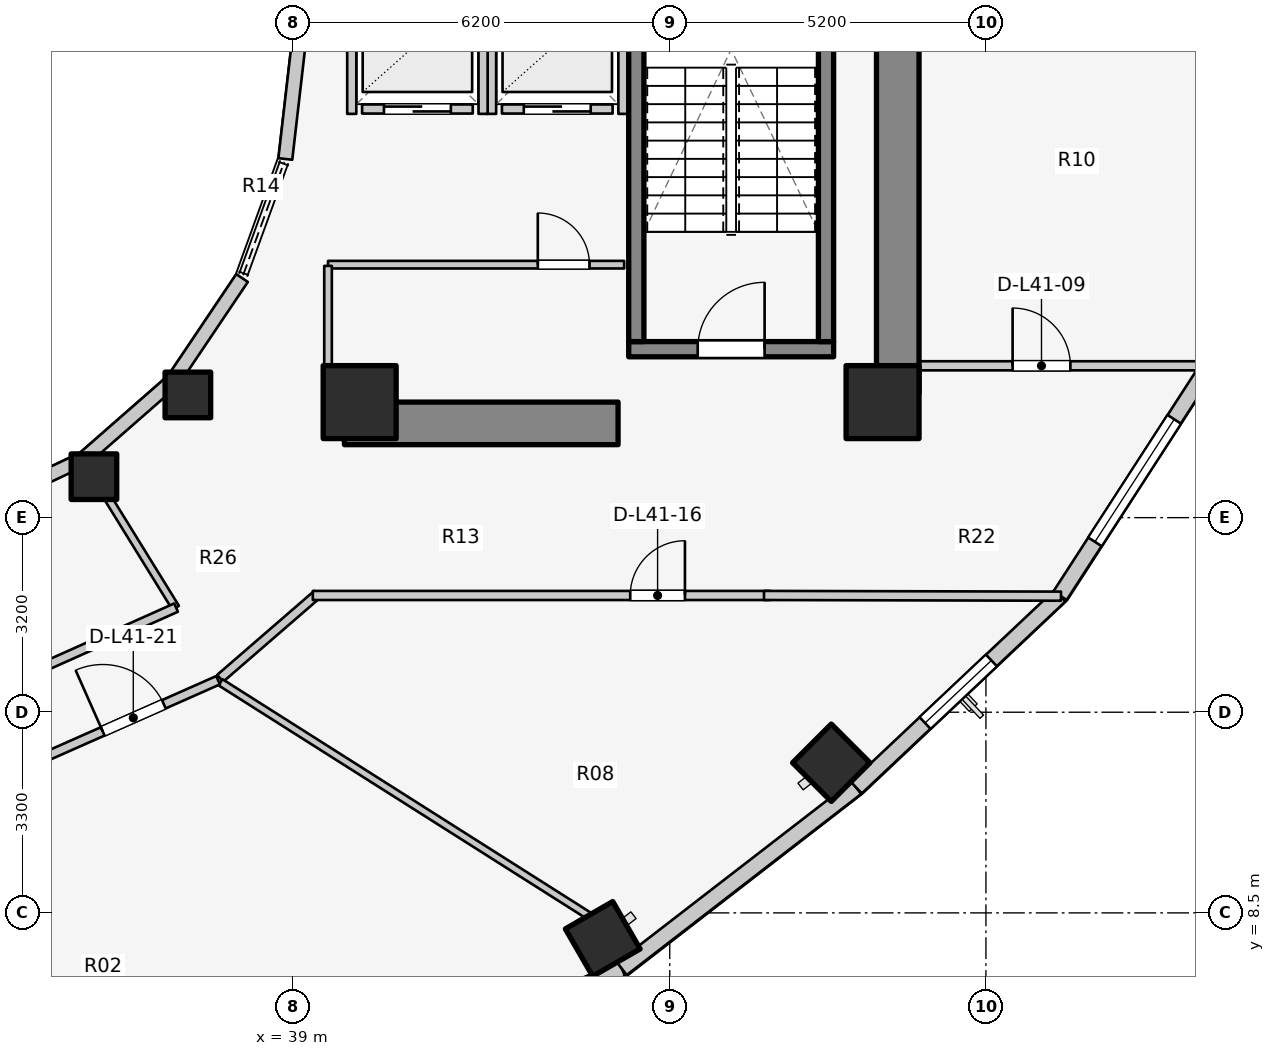
"""IFC4 building model, lengths in metres.
Left out: names, types, materials, properties, quantities, classifications, styles, units other than length and angle.
Written with IfcOpenShell. Run it as: python <this file> out.ifc"""

import sys

from ifc_helpers import new_model, si_unit, direction, frame, frame_2d, origin, origin_2d, place, context, subcontext, project, spatial, rectangle, extrude, element, fill, save


model = new_model("IFC4")
c1 = context("Model", 3, precision=1e-05, world=origin(), true_north=direction((0.0, 1.0)))
c2 = subcontext(c1, "Body", "Model", "MODEL_VIEW")
j1 = project(units=[si_unit("LENGTHUNIT", "METRE"), si_unit("PLANEANGLEUNIT", "RADIAN")], contexts=[c1])
p1 = place(None, origin())
s1 = spatial("IfcSite", under=j1, at=p1, CompositionType="ELEMENT")
p2 = place(p1, origin())
s2 = spatial("IfcBuilding", under=s1, at=p2, CompositionType="ELEMENT")
p3 = place(p2, frame((0.0, 0.0, 137.4)))
s3 = spatial("IfcBuildingStorey", under=s2, at=p3, CompositionType="ELEMENT", Elevation=137.4)
p4 = place(p3, frame((48.95, 17.05, 0.0), z_axis=(0.0, 0.0, 1.0), x_axis=(0.0, 1.0, 0.0)))
e1 = element("IfcWall", 1, at=p4, inside=s3, PredefinedType="SHEAR", context=c2, shape_type="SweptSolid", body=[
    extrude(rectangle(XDim=12.8, YDim=0.7, at=frame_2d((6.4, 0.0))), origin(), (0.0, 0.0, 1.0), 3.1),
])
p5 = place(p3, frame((39.85, 16.55, 0.0), z_axis=(0.0, 0.0, 1.0), x_axis=(1.0, 0.0, 0.0)))
e2 = element("IfcWall", 2, at=p5, inside=s3, PredefinedType="SHEAR", context=c2, shape_type="SweptSolid", body=[
    extrude(rectangle(XDim=4.5, YDim=0.7, at=frame_2d((2.25, 0.0))), origin(), (0.0, 0.0, 1.0), 3.1),
])
p6 = place(p3, frame((44.525, 17.77, 0.0), z_axis=(0.0, 0.0, 1.0), x_axis=(1.0, 0.0, 0.0)))
e3 = element("IfcWall", 3, at=p6, inside=s3, PredefinedType="SOLIDWALL", context=c2, shape_type="SweptSolid", body=[
    extrude(rectangle(XDim=3.37, YDim=0.25, at=frame_2d((1.685, 0.0))), origin(), (0.0, 0.0, 1.0), 3.1),
])
p7 = place(p6, frame((1.135, 0.0, 0.0)))
e4 = element("IfcOpeningElement", 4, at=p7, cuts=e3, PredefinedType="OPENING", context=c2, shape_type="SweptSolid", body=[
    extrude(rectangle(XDim=1.1, YDim=2.1, at=frame_2d((0.55, 1.05))), frame((0.0, 0.135, 0.0), z_axis=(0.0, -1.0, 0.0), x_axis=(1.0, 0.0, 0.0)), (0.0, 0.0, 1.0), 0.27),
])
for number, where, z_axis, x_axis in (
    (5, (44.65, 17.895, 0.0), (0.0, 0.0, 1.0), (0.0, 1.0, 0.0)),
    (6, (47.77, 17.895, 0.0), (0.0, 0.0, 1.0), (0.0, 1.0, 0.0)),
):
    element("IfcWall", number, at=place(p3, frame(where, z_axis=z_axis, x_axis=x_axis)), inside=s3, PredefinedType="SOLIDWALL", context=c2, shape_type="SweptSolid", body=[
        extrude(rectangle(XDim=7.81, YDim=0.25, at=frame_2d((3.905, 0.0))), origin(), (0.0, 0.0, 1.0), 3.1),
    ])
for number, where, z_axis, x_axis in (
    (7, (40.1, 16.9, 0.0), (0.0, 0.0, 1.0), (1.0, 0.0, 0.0)),
    (8, (48.7, 16.9, 0.0), (0.0, 0.0, 1.0), (1.0, 0.0, 0.0)),
):
    element("IfcColumn", number, at=place(p3, frame(where, z_axis=z_axis, x_axis=x_axis)), inside=s3, PredefinedType="COLUMN", context=c2, shape_type="SweptSolid", body=[
        extrude(rectangle(XDim=1.2, YDim=1.2, at=origin_2d()), origin(), (0.0, 0.0, 1.0), 3.1),
    ])
p8 = place(p3, frame((35.73, 15.673, 0.0), z_axis=(0.0, 0.0, 1.0), x_axis=(1.0, 0.0, 0.0)))
e9 = element("IfcColumn", 9, at=p8, inside=s3, PredefinedType="COLUMN", context=c2, shape_type="SweptSolid", body=[
    extrude(rectangle(XDim=0.75, YDim=0.75, at=origin_2d()), origin(), (0.0, 0.0, 1.0), 3.1),
])
p9 = place(p3, frame((44.098, 8.072, 0.0), z_axis=(0.0, 0.0, 1.0), x_axis=(0.5, -0.866025403784, 0.0)))
e10 = element("IfcColumn", 10, at=p9, inside=s3, PredefinedType="COLUMN", context=c2, shape_type="SweptSolid", body=[
    extrude(rectangle(XDim=0.9, YDim=0.9, at=origin_2d()), origin(), (0.0, 0.0, 1.0), 3.1),
])
p10 = place(p3, frame((37.275, 17.018, 0.0), z_axis=(0.0, 0.0, 1.0), x_axis=(1.0, 0.0, 0.0)))
e11 = element("IfcColumn", 11, at=p10, inside=s3, PredefinedType="COLUMN", context=c2, shape_type="SweptSolid", body=[
    extrude(rectangle(XDim=0.75, YDim=0.75, at=origin_2d()), origin(), (0.0, 0.0, 1.0), 3.1),
])
p11 = place(p3, frame((47.857, 10.969, 0.0), z_axis=(0.0, 0.0, 1.0), x_axis=(0.707106781187, -0.707106781187, 0.0)))
e12 = element("IfcColumn", 12, at=p11, inside=s3, PredefinedType="COLUMN", context=c2, shape_type="SweptSolid", body=[
    extrude(rectangle(XDim=0.9, YDim=0.9, at=origin_2d()), origin(), (0.0, 0.0, 1.0), 3.1),
])
p12 = place(p3, frame((33.843, 15.157, 0.0), z_axis=(0.0, 0.0, 1.0), x_axis=(0.904179699603, 0.427152280606, 0.0)))
e13 = element("IfcWall", 13, at=p12, inside=s3, PredefinedType="STANDARD", context=c2, shape_type="SweptSolid", body=[
    extrude(rectangle(XDim=1.899, YDim=0.23, at=frame_2d((0.95, 0.0))), origin(), (0.0, 0.0, 1.0), 2.16),
])
p13 = place(p3, frame((35.56, 15.968, 0.0), z_axis=(0.0, 0.0, 1.0), x_axis=(0.752576694707, 0.658504607869, 0.0)))
e14 = element("IfcWall", 14, at=p13, inside=s3, PredefinedType="STANDARD", context=c2, shape_type="SweptSolid", body=[
    extrude(rectangle(XDim=1.959, YDim=0.23, at=frame_2d((0.98, 0.0))), origin(), (0.0, 0.0, 1.0), 2.16),
])
p14 = place(p3, frame((37.035, 17.258, 0.0), z_axis=(0.0, 0.0, 1.0), x_axis=(0.558197800898, 0.829707909492, 0.0)))
e15 = element("IfcWall", 15, at=p14, inside=s3, PredefinedType="STANDARD", context=c2, shape_type="SweptSolid", body=[
    extrude(rectangle(XDim=2.027, YDim=0.23, at=frame_2d((1.013, 0.0))), origin(), (0.0, 0.0, 1.0), 2.16),
])
p15 = place(p3, frame((38.877, 20.898, 0.0), z_axis=(0.0, 0.0, 1.0), x_axis=(0.114711713601, 0.993398823617, 0.0)))
e16 = element("IfcWall", 16, at=p15, inside=s3, PredefinedType="STANDARD", context=c2, shape_type="SweptSolid", body=[
    extrude(rectangle(XDim=2.115, YDim=0.23, at=frame_2d((1.058, 0.0))), origin(), (0.0, 0.0, 1.0), 2.84),
])
p16 = place(p3, frame((39.365, 5.315, 0.0), z_axis=(0.0, 0.0, 1.0), x_axis=(0.912353637112, 0.409403029847, 0.0)))
e17 = element("IfcWall", 17, at=p16, inside=s3, PredefinedType="STANDARD", context=c2, shape_type="SweptSolid", body=[
    extrude(rectangle(XDim=5.533, YDim=0.26, at=frame_2d((2.766, 0.0))), origin(), (0.0, 0.0, 1.0), 2.85),
])
p17 = place(p16, frame((1.566, 0.0, 0.75)))
e18 = element("IfcOpeningElement", 18, at=p17, cuts=e17, PredefinedType="OPENING", context=c2, shape_type="SweptSolid", body=[
    extrude(rectangle(XDim=2.4, YDim=1.7, at=frame_2d((1.2, 0.85))), frame((0.0, 0.14, 0.0), z_axis=(0.0, -1.0, 0.0), x_axis=(1.0, 0.0, 0.0)), (0.0, 0.0, 1.0), 0.28),
])
p18 = place(p3, frame((44.413, 7.581, 0.0), z_axis=(0.0, 0.0, 1.0), x_axis=(0.791460185804, 0.611220724687, 0.0)))
e19 = element("IfcWall", 19, at=p18, inside=s3, PredefinedType="STANDARD", context=c2, shape_type="SweptSolid", body=[
    extrude(rectangle(XDim=4.872, YDim=0.26, at=frame_2d((2.436, 0.0))), origin(), (0.0, 0.0, 1.0), 2.85),
])
p19 = place(p3, frame((48.269, 10.559, 0.0), z_axis=(0.0, 0.0, 1.0), x_axis=(0.727667301037, 0.68593024354, 0.0)))
e20 = element("IfcWall", 20, at=p19, inside=s3, PredefinedType="STANDARD", context=c2, shape_type="SweptSolid", body=[
    extrude(rectangle(XDim=4.604, YDim=0.26, at=frame_2d((2.302, 0.0))), origin(), (0.0, 0.0, 1.0), 2.85),
])
p20 = place(p19, frame((1.552, 0.0, 0.75)))
e21 = element("IfcOpeningElement", 21, at=p20, cuts=e20, PredefinedType="OPENING", context=c2, shape_type="SweptSolid", body=[
    extrude(rectangle(XDim=1.5, YDim=1.6, at=frame_2d((0.75, 0.8))), frame((0.0, 0.14, 0.0), z_axis=(0.0, -1.0, 0.0), x_axis=(1.0, 0.0, 0.0)), (0.0, 0.0, 1.0), 0.28),
])
p21 = place(p3, frame((51.619, 13.716, 0.0), z_axis=(0.0, 0.0, 1.0), x_axis=(0.543358984534, 0.839500454989, 0.0)))
e22 = element("IfcWall", 22, at=p21, inside=s3, PredefinedType="STANDARD", context=c2, shape_type="SweptSolid", body=[
    extrude(rectangle(XDim=4.511, YDim=0.26, at=frame_2d((2.256, 0.0))), origin(), (0.0, 0.0, 1.0), 2.85),
])
p22 = place(p21, frame((1.056, 0.0, 0.75)))
e23 = element("IfcOpeningElement", 23, at=p22, cuts=e22, PredefinedType="OPENING", context=c2, shape_type="SweptSolid", body=[
    extrude(rectangle(XDim=2.4, YDim=1.7, at=frame_2d((1.2, 0.85))), frame((0.0, 0.14, 0.0), z_axis=(0.0, -1.0, 0.0), x_axis=(1.0, 0.0, 0.0)), (0.0, 0.0, 1.0), 0.28),
])
p23 = place(p3, frame((42.44, 21.72, 0.0), z_axis=(0.0, 0.0, 1.0), x_axis=(1.0, 0.0, 0.0)))
e24 = element("IfcWall", 24, at=p23, inside=s3, PredefinedType="SOLIDWALL", context=c2, shape_type="SweptSolid", body=[
    extrude(rectangle(XDim=1.82, YDim=0.15, at=frame_2d((0.91, 0.0))), origin(), (0.0, 0.0, 1.0), 2.855),
])
p24 = place(p23, frame((0.36, 0.0, 0.0)))
e25 = element("IfcOpeningElement", 25, at=p24, cuts=e24, PredefinedType="OPENING", context=c2, shape_type="SweptSolid", body=[
    extrude(rectangle(XDim=1.1, YDim=2.1, at=frame_2d((0.55, 1.05))), frame((0.0, 0.085, 0.0), z_axis=(0.0, -1.0, 0.0), x_axis=(1.0, 0.0, 0.0)), (0.0, 0.0, 1.0), 0.17),
])
for number, where, z_axis, x_axis in (
    (26, (42.27, 21.64, 0.0), (0.0, 0.0, 1.0), (0.0, 1.0, 0.0)),
    (27, (44.43, 21.64, 0.0), (0.0, 0.0, 1.0), (0.0, 1.0, 0.0)),
):
    element("IfcWall", number, at=place(p3, frame(where, z_axis=z_axis, x_axis=x_axis)), inside=s3, PredefinedType="SOLIDWALL", context=c2, shape_type="SweptSolid", body=[
        extrude(rectangle(XDim=2.32, YDim=0.15, at=frame_2d((1.16, 0.0))), origin(), (0.0, 0.0, 1.0), 2.855),
    ])
p25 = place(p3, frame((40.14, 21.72, 0.0), z_axis=(0.0, 0.0, 1.0), x_axis=(1.0, 0.0, 0.0)))
e28 = element("IfcWall", 28, at=p25, inside=s3, PredefinedType="SOLIDWALL", context=c2, shape_type="SweptSolid", body=[
    extrude(rectangle(XDim=1.82, YDim=0.15, at=frame_2d((0.91, 0.0))), origin(), (0.0, 0.0, 1.0), 2.12),
])
p26 = place(p25, frame((0.36, 0.0, 0.0)))
e29 = element("IfcOpeningElement", 29, at=p26, cuts=e28, PredefinedType="OPENING", context=c2, shape_type="SweptSolid", body=[
    extrude(rectangle(XDim=1.1, YDim=2.1, at=frame_2d((0.55, 1.05))), frame((0.0, 0.085, 0.0), z_axis=(0.0, -1.0, 0.0), x_axis=(1.0, 0.0, 0.0)), (0.0, 0.0, 1.0), 0.17),
])
p27 = place(p3, frame((39.97, 21.64, 0.0), z_axis=(0.0, 0.0, 1.0), x_axis=(0.0, 1.0, 0.0)))
e30 = element("IfcWall", 30, at=p27, inside=s3, PredefinedType="SOLIDWALL", context=c2, shape_type="SweptSolid", body=[
    extrude(rectangle(XDim=2.32, YDim=0.15, at=frame_2d((1.16, 0.0))), origin(), (0.0, 0.0, 1.0), 2.12),
])
p28 = place(p3, frame((42.13, 21.64, 0.0), z_axis=(0.0, 0.0, 1.0), x_axis=(0.0, 1.0, 0.0)))
e31 = element("IfcWall", 31, at=p28, inside=s3, PredefinedType="SOLIDWALL", context=c2, shape_type="SweptSolid", body=[
    extrude(rectangle(XDim=2.32, YDim=0.15, at=frame_2d((1.16, 0.0))), origin(), (0.0, 0.0, 1.0), 2.855),
])
p29 = place(p3, frame((39.58, 19.16, 0.0), z_axis=(0.0, 0.0, 1.0), x_axis=(1.0, 0.0, 0.0)))
e32 = element("IfcWall", 32, at=p29, inside=s3, PredefinedType="PARTITIONING", context=c2, shape_type="SweptSolid", body=[
    extrude(rectangle(XDim=4.87, YDim=0.125, at=frame_2d((2.435, 0.0))), origin(), (0.0, 0.0, 1.0), 2.12),
])
p30 = place(p29, frame((3.45, 0.0, 0.0)))
e33 = element("IfcOpeningElement", 33, at=p30, cuts=e32, PredefinedType="OPENING", context=c2, shape_type="SweptSolid", body=[
    extrude(rectangle(XDim=0.85, YDim=2.05, at=frame_2d((0.425, 1.025))), frame((0.0, 0.073, 0.0), z_axis=(0.0, -1.0, 0.0), x_axis=(1.0, 0.0, 0.0)), (0.0, 0.0, 1.0), 0.145),
])
p31 = place(p3, frame((39.58, 17.1, 0.0), z_axis=(0.0, 0.0, 1.0), x_axis=(0.0, 1.0, 0.0)))
e34 = element("IfcWall", 34, at=p31, inside=s3, PredefinedType="PARTITIONING", context=c2, shape_type="SweptSolid", body=[
    extrude(rectangle(XDim=2.04, YDim=0.125, at=frame_2d((1.02, 0.0))), origin(), (0.0, 0.0, 1.0), 2.232),
])
p32 = place(p3, frame((48.95, 17.497, 0.0), z_axis=(0.0, 0.0, 1.0), x_axis=(1.0, 0.0, 0.0)))
e35 = element("IfcWall", 35, at=p32, inside=s3, PredefinedType="PARTITIONING", context=c2, shape_type="SweptSolid", body=[
    extrude(rectangle(XDim=5.14, YDim=0.15, at=frame_2d((2.57, 0.0))), origin(), (0.0, 0.0, 1.0), 2.855),
])
p33 = place(p32, frame((1.889, 0.0, 0.0)))
e36 = element("IfcOpeningElement", 36, at=p33, cuts=e35, PredefinedType="OPENING", context=c2, shape_type="SweptSolid", body=[
    extrude(rectangle(XDim=0.95, YDim=2.1, at=frame_2d((0.475, 1.05))), frame((0.0, 0.085, 0.0), z_axis=(0.0, -1.0, 0.0), x_axis=(1.0, 0.0, 0.0)), (0.0, 0.0, 1.0), 0.17),
])
p34 = place(p3, frame((37.807, 12.358, 0.0), z_axis=(0.0, 0.0, 1.0), x_axis=(0.756055312247, 0.654507727092, 0.0)))
e37 = element("IfcWall", 37, at=p34, inside=s3, PredefinedType="PARTITIONING", context=c2, shape_type="SweptSolid", body=[
    extrude(rectangle(XDim=2.111, YDim=0.15, at=frame_2d((1.055, 0.0))), origin(), (0.0, 0.0, 1.0), 2.299),
])
p35 = place(p3, frame((39.33, 13.72, 0.0), z_axis=(0.0, 0.0, 1.0), x_axis=(1.0, 0.0, 0.0)))
e38 = element("IfcWall", 38, at=p35, inside=s3, PredefinedType="PARTITIONING", context=c2, shape_type="SweptSolid", body=[
    extrude(rectangle(XDim=7.52, YDim=0.15, at=frame_2d((3.76, 0.0))), origin(), (0.0, 0.0, 1.0), 2.299),
])
p36 = place(p35, frame((5.22, 0.0, 0.0)))
e39 = element("IfcOpeningElement", 39, at=p36, cuts=e38, PredefinedType="OPENING", context=c2, shape_type="SweptSolid", body=[
    extrude(rectangle(XDim=0.9, YDim=2.1, at=frame_2d((0.45, 1.05))), frame((0.0, 0.085, 0.0), z_axis=(0.0, -1.0, 0.0), x_axis=(1.0, 0.0, 0.0)), (0.0, 0.0, 1.0), 0.17),
])
p37 = place(p3, frame((46.75, 13.72, 0.0), z_axis=(0.0, 0.0, 1.0), x_axis=(0.999997122315, -0.00239903348, 0.0)))
e40 = element("IfcWall", 40, at=p37, inside=s3, PredefinedType="PARTITIONING", context=c2, shape_type="SweptSolid", body=[
    extrude(rectangle(XDim=4.885, YDim=0.15, at=frame_2d((2.442, 0.0))), origin(), (0.0, 0.0, 1.0), 2.22),
])
p38 = place(p3, frame((35.55, 15.985, 0.0), z_axis=(0.0, 0.0, 1.0), x_axis=(0.525627246902, -0.850714991824, 0.0)))
e41 = element("IfcWall", 41, at=p38, inside=s3, PredefinedType="PARTITIONING", context=c2, shape_type="SweptSolid", body=[
    extrude(rectangle(XDim=2.901, YDim=0.125, at=frame_2d((1.451, 0.0))), origin(), (0.0, 0.0, 1.0), 2.299),
])
p39 = place(p3, frame((34.625, 12.423, 0.0), z_axis=(0.0, 0.0, 1.0), x_axis=(0.912888568324, 0.408208845842, 0.0)))
e42 = element("IfcWall", 42, at=p39, inside=s3, PredefinedType="PARTITIONING", context=c2, shape_type="SweptSolid", body=[
    extrude(rectangle(XDim=2.69, YDim=0.15, at=frame_2d((1.345, 0.0))), origin(), (0.0, 0.0, 1.0), 2.299),
])
p40 = place(p3, frame((37.812, 12.292, 0.0), z_axis=(0.0, 0.0, 1.0), x_axis=(0.844640430122, -0.535334048799, 0.0)))
e43 = element("IfcWall", 43, at=p40, inside=s3, PredefinedType="MOVABLE", context=c2, shape_type="SweptSolid", body=[
    extrude(rectangle(XDim=7.188, YDim=0.12, at=frame_2d((3.594, 0.0))), origin(), (0.0, 0.0, 1.0), 2.299),
])
p41 = place(p3, frame((34.982, 11.09, 0.0), z_axis=(0.0, 0.0, 1.0), x_axis=(0.914216890927, 0.405225216815, 0.0)))
e44 = element("IfcWall", 44, at=p41, inside=s3, PredefinedType="PARTITIONING", context=c2, shape_type="SweptSolid", body=[
    extrude(rectangle(XDim=3.052, YDim=0.15, at=frame_2d((1.526, 0.0))), origin(), (0.0, 0.0, 1.0), 2.299),
])
p42 = place(p41, frame((0.976, 0.0, 0.0)))
e45 = element("IfcOpeningElement", 45, at=p42, cuts=e44, PredefinedType="OPENING", context=c2, shape_type="SweptSolid", body=[
    extrude(rectangle(XDim=1.1, YDim=2.1, at=frame_2d((0.55, 1.05))), frame((0.0, 0.085, 0.0), z_axis=(0.0, -1.0, 0.0), x_axis=(1.0, 0.0, 0.0)), (0.0, 0.0, 1.0), 0.17),
])
p43 = place(p20, origin())
e46 = element("IfcWindow", 46, at=p43, inside=s3, PartitioningType="SINGLE_PANEL", PredefinedType="WINDOW", context=c2, shape_type="SweptSolid", body=[
    extrude(rectangle(XDim=1.5, YDim=1.6, at=frame_2d((0.75, 0.8))), frame((0.0, 0.03, 0.0), z_axis=(0.0, -1.0, 0.0), x_axis=(1.0, 0.0, 0.0)), (0.0, 0.0, 1.0), 0.06),
])
fill(e21, e46)
p44 = place(p22, origin())
e47 = element("IfcWindow", 47, at=p44, inside=s3, PartitioningType="SINGLE_PANEL", PredefinedType="WINDOW", context=c2, shape_type="SweptSolid", body=[
    extrude(rectangle(XDim=2.4, YDim=1.7, at=frame_2d((1.2, 0.85))), frame((0.0, 0.03, 0.0), z_axis=(0.0, -1.0, 0.0), x_axis=(1.0, 0.0, 0.0)), (0.0, 0.0, 1.0), 0.06),
])
fill(e23, e47)
p45 = place(p7, origin())
e48 = element("IfcDoor", 48, at=p45, inside=s3, OperationType="SINGLE_SWING_RIGHT", PredefinedType="DOOR", context=c2, shape_type="SweptSolid", body=[
    extrude(rectangle(XDim=1.1, YDim=2.1, at=frame_2d((0.55, 1.05))), frame((0.0, 0.025, 0.0), z_axis=(0.0, -1.0, 0.0), x_axis=(1.0, 0.0, 0.0)), (0.0, 0.0, 1.0), 0.05),
])
fill(e4, e48)
p46 = place(p24, origin())
e49 = element("IfcDoor", 49, at=p46, inside=s3, OperationType="DOUBLE_DOOR_SLIDING", PredefinedType="DOOR", context=c2, shape_type="SweptSolid", body=[
    extrude(rectangle(XDim=1.1, YDim=2.1, at=frame_2d((0.55, 1.05))), frame((0.0, 0.025, 0.0), z_axis=(0.0, -1.0, 0.0), x_axis=(1.0, 0.0, 0.0)), (0.0, 0.0, 1.0), 0.05),
])
fill(e25, e49)
p47 = place(p26, origin())
e50 = element("IfcDoor", 50, at=p47, inside=s3, OperationType="DOUBLE_DOOR_SLIDING", PredefinedType="DOOR", context=c2, shape_type="SweptSolid", body=[
    extrude(rectangle(XDim=1.1, YDim=2.1, at=frame_2d((0.55, 1.05))), frame((0.0, 0.025, 0.0), z_axis=(0.0, -1.0, 0.0), x_axis=(1.0, 0.0, 0.0)), (0.0, 0.0, 1.0), 0.05),
])
fill(e29, e50)
p48 = place(p30, origin())
e51 = element("IfcDoor", 51, at=p48, inside=s3, OperationType="SINGLE_SWING_LEFT", PredefinedType="DOOR", context=c2, shape_type="SweptSolid", body=[
    extrude(rectangle(XDim=0.85, YDim=2.05, at=frame_2d((0.425, 1.025))), frame((0.0, 0.025, 0.0), z_axis=(0.0, -1.0, 0.0), x_axis=(1.0, 0.0, 0.0)), (0.0, 0.0, 1.0), 0.05),
])
fill(e33, e51)
p49 = place(p33, origin())
e52 = element("IfcDoor", 52, at=p49, inside=s3, OperationType="SINGLE_SWING_LEFT", PredefinedType="DOOR", context=c2, shape_type="SweptSolid", body=[
    extrude(rectangle(XDim=0.95, YDim=2.1, at=frame_2d((0.475, 1.05))), frame((0.0, 0.025, 0.0), z_axis=(0.0, -1.0, 0.0), x_axis=(1.0, 0.0, 0.0)), (0.0, 0.0, 1.0), 0.05),
])
fill(e36, e52)
p50 = place(p36, origin())
e53 = element("IfcDoor", 53, at=p50, inside=s3, OperationType="SINGLE_SWING_RIGHT", PredefinedType="DOOR", context=c2, shape_type="SweptSolid", body=[
    extrude(rectangle(XDim=0.9, YDim=2.1, at=frame_2d((0.45, 1.05))), frame((0.0, 0.025, 0.0), z_axis=(0.0, -1.0, 0.0), x_axis=(1.0, 0.0, 0.0)), (0.0, 0.0, 1.0), 0.05),
])
fill(e39, e53)
p51 = place(p42, origin())
e54 = element("IfcDoor", 54, at=p51, inside=s3, OperationType="SINGLE_SWING_LEFT", PredefinedType="DOOR", context=c2, shape_type="SweptSolid", body=[
    extrude(rectangle(XDim=1.1, YDim=2.1, at=frame_2d((0.55, 1.05))), frame((0.0, 0.025, 0.0), z_axis=(0.0, -1.0, 0.0), x_axis=(1.0, 0.0, 0.0)), (0.0, 0.0, 1.0), 0.05),
])
fill(e45, e54)
save(model, sys.argv[1])
